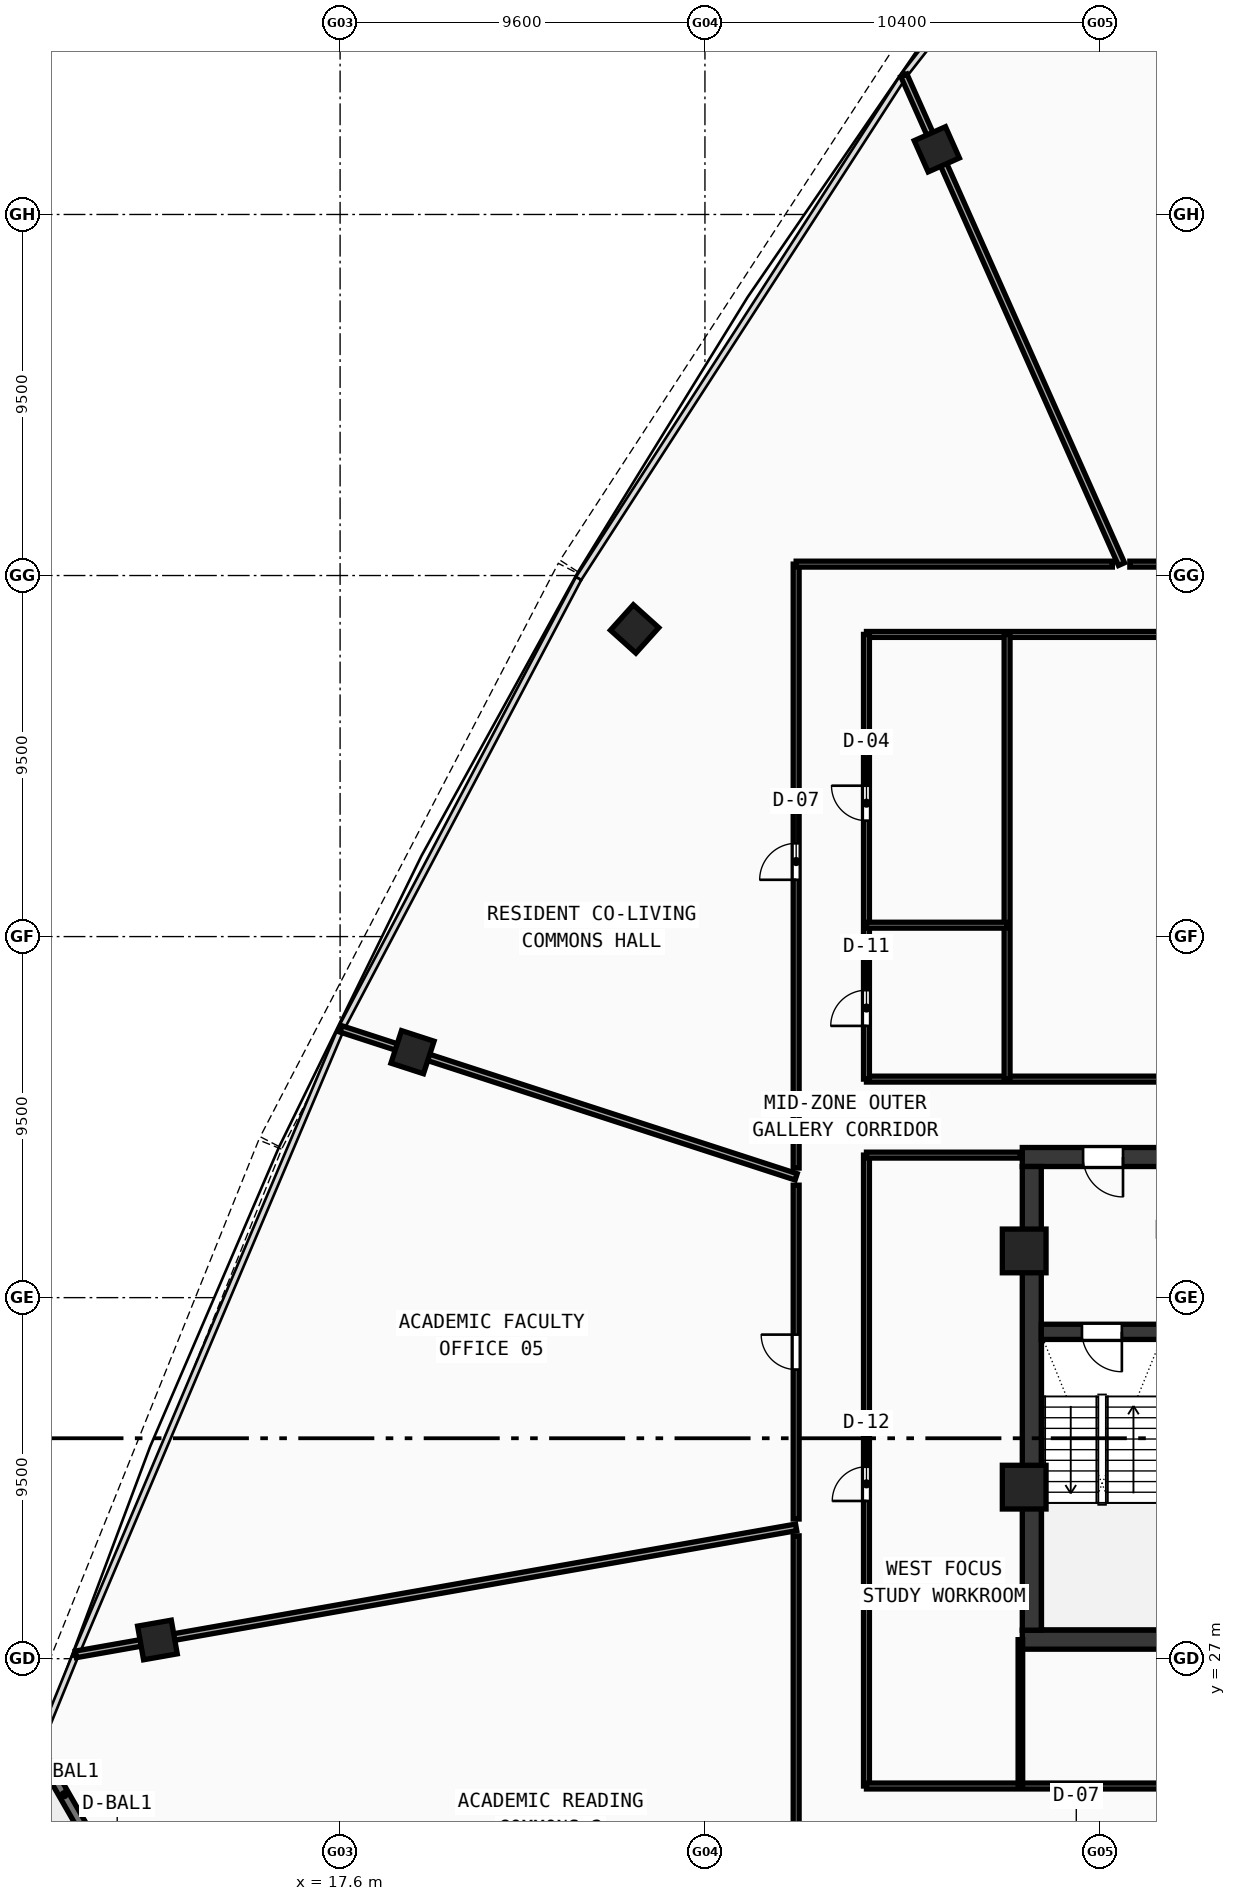
"""IFC4 building model, lengths in metres.
Left out: names, types, materials, properties, quantities, classifications, styles, units other than length and angle.
Written with IfcOpenShell. Run it as: python <this file> out.ifc"""

import sys

from ifc_helpers import new_model, si_unit, direction, frame, frame_2d, origin, origin_with_axes, origin_2d, place, context, subcontext, project, spatial, rectangle, hollow_rectangle, extrude, source, transform, mapped, element, fill, save


model = new_model("IFC4")
c1 = context("Model", 3, precision=1e-05, world=origin(), true_north=direction((0.0, 1.0)))
c2 = subcontext(c1, "Body", "Model", "MODEL_VIEW")
j1 = project(units=[si_unit("LENGTHUNIT", "METRE"), si_unit("PLANEANGLEUNIT", "RADIAN")], contexts=[c1])
p1 = place(None, origin())
s1 = spatial("IfcSite", under=j1, at=p1, CompositionType="ELEMENT")
p2 = place(p1, origin())
s2 = spatial("IfcBuilding", under=s1, at=p2, CompositionType="ELEMENT")
p3 = place(p2, frame((0.0, 0.0, 192.36)))
s3 = spatial("IfcBuildingStorey", under=s2, at=p3, CompositionType="ELEMENT", Elevation=192.36)
p4 = place(p3, frame((35.55, 27.5, 0.0), z_axis=(0.0, 0.0, 1.0), x_axis=(1.0, 0.0, 0.0)))
e1 = element("IfcWall", 1, at=p4, inside=s3, PredefinedType="SHEAR", context=c2, shape_type="SweptSolid", body=[
    extrude(rectangle(XDim=24.9, YDim=0.5, at=frame_2d((12.45, 0.0))), origin(), (0.0, 0.0, 1.0), 3.54),
])
p5 = place(p3, frame((35.55, 40.2, 0.0), z_axis=(0.0, 0.0, 1.0), x_axis=(1.0, 0.0, 0.0)))
e2 = element("IfcWall", 2, at=p5, inside=s3, PredefinedType="SHEAR", context=c2, shape_type="SweptSolid", body=[
    extrude(rectangle(XDim=11.25, YDim=0.5, at=frame_2d((5.625, 0.0))), origin(), (0.0, 0.0, 1.0), 3.54),
])
p6 = place(p5, frame((1.6, 0.0, 0.0)))
e3 = element("IfcOpeningElement", 3, at=p6, cuts=e2, PredefinedType="OPENING", context=c2, shape_type="SweptSolid", body=[
    extrude(rectangle(XDim=1.05, YDim=2.1, at=frame_2d((0.525, 1.05))), frame((0.0, 0.26, 0.0), z_axis=(0.0, -1.0, 0.0), x_axis=(1.0, 0.0, 0.0)), (0.0, 0.0, 1.0), 0.52),
])
p7 = place(p3, frame((35.8, 27.75, 0.0), z_axis=(0.0, 0.0, 1.0), x_axis=(0.0, 1.0, 0.0)))
e4 = element("IfcWall", 4, at=p7, inside=s3, PredefinedType="SHEAR", context=c2, shape_type="SweptSolid", body=[
    extrude(rectangle(XDim=12.2, YDim=0.5, at=frame_2d((6.1, 0.0))), origin(), (0.0, 0.0, 1.0), 3.54),
])
p8 = place(p3, frame((36.05, 35.6, 0.0), z_axis=(0.0, 0.0, 1.0), x_axis=(1.0, 0.0, 0.0)))
e5 = element("IfcWall", 5, at=p8, inside=s3, PredefinedType="SHEAR", context=c2, shape_type="SweptSolid", body=[
    extrude(rectangle(XDim=3.15, YDim=0.4, at=frame_2d((1.575, 0.0))), origin(), (0.0, 0.0, 1.0), 3.54),
])
p9 = place(p8, frame((1.07, 0.0, 0.0)))
e6 = element("IfcOpeningElement", 6, at=p9, cuts=e5, PredefinedType="OPENING", context=c2, shape_type="SweptSolid", body=[
    extrude(rectangle(XDim=1.05, YDim=2.1, at=frame_2d((0.525, 1.05))), frame((0.0, 0.21, 0.0), z_axis=(0.0, -1.0, 0.0), x_axis=(1.0, 0.0, 0.0)), (0.0, 0.0, 1.0), 0.42),
])
m1 = source(origin(), c2, "Body", "SweptSolid", [
    extrude(hollow_rectangle(XDim=1.15, YDim=1.15, WallThickness=0.048, at=origin_2d()), origin(), (0.0, 0.0, 1.0), 3.8),
])
for number, where, z_axis, x_axis in (
    (7, (35.6, 37.729, -0.26), (0.0, 0.0, 1.0), (1.0, 0.0, 0.0)),
    (8, (35.6, 31.513, -0.26), (0.0, 0.0, 1.0), (1.0, 0.0, 0.0)),
):
    element("IfcColumn", number, at=place(p3, frame(where, z_axis=z_axis, x_axis=x_axis)), inside=s3, PredefinedType="COLUMN", context=c2, shape_type="MappedRepresentation", body=[
        mapped(m1, transform((0.0, 0.0, 0.0), scale=1.0)),
    ])
m2 = source(origin(), c2, "Body", "SweptSolid", [
    extrude(hollow_rectangle(XDim=0.9, YDim=0.9, WallThickness=0.036, at=origin_2d()), origin(), (0.0, 0.0, 1.0), 3.8),
])
for number, where, z_axis, x_axis in (
    (9, (33.301, 66.715, -0.26), (0.0, 0.0, 1.0), (-0.914, -0.407, 0.0)),
    (10, (25.349, 54.095, -0.26), (0.0, 0.0, 1.0), (-0.669, -0.743, 0.0)),
    (11, (19.505, 42.958, -0.26), (0.0, 0.0, 1.0), (-0.309, -0.951, 0.0)),
    (12, (12.793, 27.492, -0.26), (0.0, 0.0, 1.0), (0.174, -0.985, 0.0)),
):
    element("IfcColumn", number, at=place(p3, frame(where, z_axis=z_axis, x_axis=x_axis)), inside=s3, PredefinedType="COLUMN", context=c2, shape_type="MappedRepresentation", body=[
        mapped(m2, transform((0.0, 0.0, 0.0), scale=1.0)),
    ])
p10 = place(p3, frame((9.611, 24.686, 0.0), z_axis=(0.0, 0.0, 1.0), x_axis=(0.497930869929, -0.867216725376, 0.0)))
e13 = element("IfcWall", 13, at=p10, inside=s3, PredefinedType="STANDARD", context=c2, shape_type="SweptSolid", body=[
    extrude(rectangle(XDim=8.534, YDim=0.26, at=frame_2d((4.267, 0.0))), origin(), (0.0, 0.0, 1.0), 3.54),
])
p11 = place(p10, frame((3.367, 0.0, 0.0)))
e14 = element("IfcOpeningElement", 14, at=p11, cuts=e13, PredefinedType="OPENING", context=c2, shape_type="SweptSolid", body=[
    extrude(rectangle(XDim=1.8, YDim=2.15, at=frame_2d((0.9, 1.075))), frame((0.0, 0.14, 0.0), z_axis=(0.0, -1.0, 0.0), x_axis=(1.0, 0.0, 0.0)), (0.0, 0.0, 1.0), 0.28),
])
p12 = place(p3, frame((31.45, 42.25, 0.0), z_axis=(0.0, 0.0, 1.0), x_axis=(1.0, 0.0, 0.0)))
e15 = element("IfcWall", 15, at=p12, inside=s3, PredefinedType="PARTITIONING", context=c2, shape_type="SweptSolid", body=[
    extrude(rectangle(XDim=33.1, YDim=0.155, at=frame_2d((16.55, 0.0))), origin(), (0.0, 0.0, 1.0), 2.89),
])
p13 = place(p3, frame((31.45, 53.95, 0.0), z_axis=(0.0, 0.0, 1.0), x_axis=(1.0, 0.0, 0.0)))
e16 = element("IfcWall", 16, at=p13, inside=s3, PredefinedType="PARTITIONING", context=c2, shape_type="SweptSolid", body=[
    extrude(rectangle(XDim=33.1, YDim=0.155, at=frame_2d((16.55, 0.0))), origin(), (0.0, 0.0, 1.0), 2.89),
])
p14 = place(p13, frame((8.0, 0.0, 0.0)))
e17 = element("IfcOpeningElement", 17, at=p14, cuts=e16, PredefinedType="OPENING", context=c2, shape_type="SweptSolid", body=[
    extrude(rectangle(XDim=0.92, YDim=2.1, at=frame_2d((0.46, 1.05))), frame((0.0, 0.087, 0.0), z_axis=(0.0, -1.0, 0.0), x_axis=(1.0, 0.0, 0.0)), (0.0, 0.0, 1.0), 0.175),
])
p15 = place(p13, frame((26.05, 0.0, 0.0)))
e18 = element("IfcOpeningElement", 18, at=p15, cuts=e16, PredefinedType="OPENING", context=c2, shape_type="SweptSolid", body=[
    extrude(rectangle(XDim=0.92, YDim=2.1, at=frame_2d((0.46, 1.05))), frame((0.0, 0.087, 0.0), z_axis=(0.0, -1.0, 0.0), x_axis=(1.0, 0.0, 0.0)), (0.0, 0.0, 1.0), 0.175),
])
p16 = place(p3, frame((31.45, 42.25, 0.0), z_axis=(0.0, 0.0, 1.0), x_axis=(0.0, 1.0, 0.0)))
e19 = element("IfcWall", 19, at=p16, inside=s3, PredefinedType="PARTITIONING", context=c2, shape_type="SweptSolid", body=[
    extrude(rectangle(XDim=11.7, YDim=0.155, at=frame_2d((5.85, 0.0))), origin(), (0.0, 0.0, 1.0), 2.89),
])
p17 = place(p16, frame((1.4, 0.0, 0.0)))
e20 = element("IfcOpeningElement", 20, at=p17, cuts=e19, PredefinedType="OPENING", context=c2, shape_type="SweptSolid", body=[
    extrude(rectangle(XDim=0.94, YDim=2.1, at=frame_2d((0.47, 1.05))), frame((0.0, 0.087, 0.0), z_axis=(0.0, -1.0, 0.0), x_axis=(1.0, 0.0, 0.0)), (0.0, 0.0, 1.0), 0.175),
])
p18 = place(p16, frame((6.8, 0.0, 0.0)))
e21 = element("IfcOpeningElement", 21, at=p18, cuts=e19, PredefinedType="OPENING", context=c2, shape_type="SweptSolid", body=[
    extrude(rectangle(XDim=0.92, YDim=2.1, at=frame_2d((0.46, 1.05))), frame((0.0, 0.087, 0.0), z_axis=(0.0, -1.0, 0.0), x_axis=(1.0, 0.0, 0.0)), (0.0, 0.0, 1.0), 0.175),
])
p19 = place(p3, frame((35.15, 42.25, 0.0), z_axis=(0.0, 0.0, 1.0), x_axis=(0.0, 1.0, 0.0)))
e22 = element("IfcWall", 22, at=p19, inside=s3, PredefinedType="PARTITIONING", context=c2, shape_type="SweptSolid", body=[
    extrude(rectangle(XDim=11.7, YDim=0.155, at=frame_2d((5.85, 0.0))), origin(), (0.0, 0.0, 1.0), 2.89),
])
p20 = place(p3, frame((31.45, 46.3, 0.0), z_axis=(0.0, 0.0, 1.0), x_axis=(1.0, 0.0, 0.0)))
e23 = element("IfcWall", 23, at=p20, inside=s3, PredefinedType="PARTITIONING", context=c2, shape_type="SweptSolid", body=[
    extrude(rectangle(XDim=3.7, YDim=0.155, at=frame_2d((1.85, 0.0))), origin(), (0.0, 0.0, 1.0), 2.89),
])
p21 = place(p3, frame((31.45, 23.65, 0.0), z_axis=(0.0, 0.0, 1.0), x_axis=(0.0, 1.0, 0.0)))
e24 = element("IfcWall", 24, at=p21, inside=s3, PredefinedType="PARTITIONING", context=c2, shape_type="SweptSolid", body=[
    extrude(rectangle(XDim=16.6, YDim=0.155, at=frame_2d((8.3, 0.0))), origin(), (0.0, 0.0, 1.0), 2.89),
])
p22 = place(p21, frame((7.5, 0.0, 0.0)))
e25 = element("IfcOpeningElement", 25, at=p22, cuts=e24, PredefinedType="OPENING", context=c2, shape_type="SweptSolid", body=[
    extrude(rectangle(XDim=0.9, YDim=2.08, at=frame_2d((0.45, 1.04))), frame((0.0, 0.087, 0.0), z_axis=(0.0, -1.0, 0.0), x_axis=(1.0, 0.0, 0.0)), (0.0, 0.0, 1.0), 0.175),
])
p23 = place(p3, frame((31.45, 23.65, 0.0), z_axis=(0.0, 0.0, 1.0), x_axis=(1.0, 0.0, 0.0)))
e26 = element("IfcWall", 26, at=p23, inside=s3, PredefinedType="PARTITIONING", context=c2, shape_type="SweptSolid", body=[
    extrude(rectangle(XDim=33.1, YDim=0.155, at=frame_2d((16.55, 0.0))), origin(), (0.0, 0.0, 1.0), 2.89),
])
p24 = place(p23, frame((16.0, 0.0, 0.0)))
e27 = element("IfcOpeningElement", 27, at=p24, cuts=e26, PredefinedType="OPENING", context=c2, shape_type="SweptSolid", body=[
    extrude(rectangle(XDim=0.92, YDim=2.1, at=frame_2d((0.46, 1.05))), frame((0.0, 0.087, 0.0), z_axis=(0.0, -1.0, 0.0), x_axis=(1.0, 0.0, 0.0)), (0.0, 0.0, 1.0), 0.175),
])
p25 = place(p3, frame((31.45, 40.25, 0.0), z_axis=(0.0, 0.0, 1.0), x_axis=(1.0, 0.0, 0.0)))
e28 = element("IfcWall", 28, at=p25, inside=s3, PredefinedType="PARTITIONING", context=c2, shape_type="SweptSolid", body=[
    extrude(rectangle(XDim=4.05, YDim=0.155, at=frame_2d((2.025, 0.0))), origin(), (0.0, 0.0, 1.0), 3.54),
])
p26 = place(p3, frame((35.5, 23.65, 0.0), z_axis=(0.0, 0.0, 1.0), x_axis=(0.0, 1.0, 0.0)))
e29 = element("IfcWall", 29, at=p26, inside=s3, PredefinedType="PARTITIONING", context=c2, shape_type="SweptSolid", body=[
    extrude(rectangle(XDim=3.85, YDim=0.12, at=frame_2d((1.925, 0.0))), origin(), (0.0, 0.0, 1.0), 3.14),
])
p27 = place(p3, frame((38.16, 55.8, 0.0), z_axis=(0.0, 0.0, 1.0), x_axis=(-0.406725691424, 0.913550333554, 0.0)))
e30 = element("IfcWall", 30, at=p27, inside=s3, PredefinedType="PARTITIONING", context=c2, shape_type="SweptSolid", body=[
    extrude(rectangle(XDim=14.078, YDim=0.175, at=frame_2d((7.039, 0.0))), origin(), (0.0, 0.0, 1.0), 2.89),
])
p28 = place(p3, frame((29.6, 39.678, 0.0), z_axis=(0.0, 0.0, 1.0), x_axis=(-0.951056149915, 0.309018121975, 0.0)))
e31 = element("IfcWall", 31, at=p28, inside=s3, PredefinedType="PARTITIONING", context=c2, shape_type="SweptSolid", body=[
    extrude(rectangle(XDim=12.593, YDim=0.175, at=frame_2d((6.296, 0.0))), origin(), (0.0, 0.0, 1.0), 2.89),
])
p29 = place(p3, frame((29.6, 30.456, 0.0), z_axis=(0.0, 0.0, 1.0), x_axis=(-0.984807685374, -0.173648561263, 0.0)))
e32 = element("IfcWall", 32, at=p29, inside=s3, PredefinedType="PARTITIONING", context=c2, shape_type="SweptSolid", body=[
    extrude(rectangle(XDim=19.246, YDim=0.175, at=frame_2d((9.623, 0.0))), origin(), (0.0, 0.0, 1.0), 2.89),
])
p30 = place(p3, frame((29.6, 21.8, 0.0), z_axis=(0.0, 0.0, 1.0), x_axis=(0.0, 1.0, 0.0)))
e33 = element("IfcWall", 33, at=p30, inside=s3, PredefinedType="PARTITIONING", context=c2, shape_type="SweptSolid", body=[
    extrude(rectangle(XDim=8.432, YDim=0.155, at=frame_2d((4.216, 0.0))), origin(), (0.0, 0.0, 1.0), 3.14),
])
p31 = place(p3, frame((29.6, 30.675, 0.0), z_axis=(0.0, 0.0, 1.0), x_axis=(0.0, 1.0, 0.0)))
e34 = element("IfcWall", 34, at=p31, inside=s3, PredefinedType="PARTITIONING", context=c2, shape_type="SweptSolid", body=[
    extrude(rectangle(XDim=8.783, YDim=0.155, at=frame_2d((4.392, 0.0))), origin(), (0.0, 0.0, 1.0), 3.14),
])
p32 = place(p31, frame((3.932, 0.0, 0.0)))
e35 = element("IfcOpeningElement", 35, at=p32, cuts=e34, PredefinedType="OPENING", context=c2, shape_type="SweptSolid", body=[
    extrude(rectangle(XDim=0.92, YDim=2.1, at=frame_2d((0.46, 1.05))), frame((0.0, 0.087, 0.0), z_axis=(0.0, -1.0, 0.0), x_axis=(1.0, 0.0, 0.0)), (0.0, 0.0, 1.0), 0.175),
])
p33 = place(p3, frame((29.6, 39.91, 0.0), z_axis=(0.0, 0.0, 1.0), x_axis=(0.0, 1.0, 0.0)))
e36 = element("IfcWall", 36, at=p33, inside=s3, PredefinedType="PARTITIONING", context=c2, shape_type="SweptSolid", body=[
    extrude(rectangle(XDim=15.89, YDim=0.155, at=frame_2d((7.945, 0.0))), origin(), (0.0, 0.0, 1.0), 2.89),
])
p34 = place(p33, frame((7.584, 0.0, 0.0)))
e37 = element("IfcOpeningElement", 37, at=p34, cuts=e36, PredefinedType="OPENING", context=c2, shape_type="SweptSolid", body=[
    extrude(rectangle(XDim=0.96, YDim=2.12, at=frame_2d((0.48, 1.06))), frame((0.0, 0.087, 0.0), z_axis=(0.0, -1.0, 0.0), x_axis=(1.0, 0.0, 0.0)), (0.0, 0.0, 1.0), 0.175),
])
p35 = place(p3, frame((29.6, 55.8, 0.0), z_axis=(0.0, 0.0, 1.0), x_axis=(1.0, 0.0, 0.0)))
e38 = element("IfcWall", 38, at=p35, inside=s3, PredefinedType="PARTITIONING", context=c2, shape_type="SweptSolid", body=[
    extrude(rectangle(XDim=8.32, YDim=0.155, at=frame_2d((4.16, 0.0))), origin(), (0.0, 0.0, 1.0), 3.14),
])
p36 = place(p3, frame((38.38, 55.8, 0.0), z_axis=(0.0, 0.0, 1.0), x_axis=(1.0, 0.0, 0.0)))
e39 = element("IfcWall", 39, at=p36, inside=s3, PredefinedType="PARTITIONING", context=c2, shape_type="SweptSolid", body=[
    extrude(rectangle(XDim=5.329, YDim=0.155, at=frame_2d((2.665, 0.0))), origin(), (0.0, 0.0, 1.0), 2.89),
])
p37 = place(p36, frame((2.13, 0.0, 0.0)))
e40 = element("IfcOpeningElement", 40, at=p37, cuts=e39, PredefinedType="OPENING", context=c2, shape_type="SweptSolid", body=[
    extrude(rectangle(XDim=0.92, YDim=2.1, at=frame_2d((0.46, 1.05))), frame((0.0, 0.087, 0.0), z_axis=(0.0, -1.0, 0.0), x_axis=(1.0, 0.0, 0.0)), (0.0, 0.0, 1.0), 0.175),
])
m3 = source(origin(), c2, "Body", "SweptSolid", [
    extrude(rectangle(XDim=1.05, YDim=2.1, at=frame_2d((0.525, 1.05))), frame((0.0, 0.025, 0.0), z_axis=(0.0, -1.0, 0.0), x_axis=(1.0, 0.0, 0.0)), (0.0, 0.0, 1.0), 0.05),
])
p38 = place(p9, frame((1.05, 0.0, 0.0), z_axis=(0.0, 0.0, 1.0), x_axis=(-1.0, 0.0, 0.0)))
e41 = element("IfcDoor", 41, at=p38, inside=s3, OperationType="SINGLE_SWING_LEFT", PredefinedType="DOOR", context=c2, shape_type="MappedRepresentation", body=[
    mapped(m3, transform((0.0, 0.0, 0.0), scale=1.0)),
])
fill(e6, e41)
p39 = place(p6, frame((1.05, 0.0, 0.0), z_axis=(0.0, 0.0, 1.0), x_axis=(-1.0, 0.0, 0.0)))
e42 = element("IfcDoor", 42, at=p39, inside=s3, OperationType="SINGLE_SWING_LEFT", PredefinedType="DOOR", context=c2, shape_type="MappedRepresentation", body=[
    mapped(m3, transform((0.0, 0.0, 0.0), scale=1.0)),
])
fill(e3, e42)
m4 = source(origin(), c2, "Body", "SweptSolid", [
    extrude(rectangle(XDim=0.94, YDim=2.1, at=frame_2d((0.47, 1.05))), frame((0.0, 0.025, 0.0), z_axis=(0.0, -1.0, 0.0), x_axis=(1.0, 0.0, 0.0)), (0.0, 0.0, 1.0), 0.05),
])
p40 = place(p17, origin_with_axes())
e43 = element("IfcDoor", 43, at=p40, inside=s3, OperationType="SINGLE_SWING_LEFT", PredefinedType="DOOR", context=c2, shape_type="MappedRepresentation", body=[
    mapped(m4, transform((0.0, 0.0, 0.0), scale=1.0)),
])
fill(e20, e43)
m5 = source(origin(), c2, "Body", "SweptSolid", [
    extrude(rectangle(XDim=0.92, YDim=2.1, at=frame_2d((0.46, 1.05))), frame((0.0, 0.025, 0.0), z_axis=(0.0, -1.0, 0.0), x_axis=(1.0, 0.0, 0.0)), (0.0, 0.0, 1.0), 0.05),
])
p41 = place(p18, origin_with_axes())
e44 = element("IfcDoor", 44, at=p41, inside=s3, OperationType="SINGLE_SWING_RIGHT", PredefinedType="DOOR", context=c2, shape_type="MappedRepresentation", body=[
    mapped(m5, transform((0.0, 0.0, 0.0), scale=1.0)),
])
fill(e21, e44)
m6 = source(origin(), c2, "Body", "SweptSolid", [
    extrude(rectangle(XDim=0.9, YDim=2.08, at=frame_2d((0.45, 1.04))), frame((0.0, 0.025, 0.0), z_axis=(0.0, -1.0, 0.0), x_axis=(1.0, 0.0, 0.0)), (0.0, 0.0, 1.0), 0.05),
])
p42 = place(p22, origin_with_axes())
e45 = element("IfcDoor", 45, at=p42, inside=s3, OperationType="SINGLE_SWING_LEFT", PredefinedType="DOOR", context=c2, shape_type="MappedRepresentation", body=[
    mapped(m6, transform((0.0, 0.0, 0.0), scale=1.0)),
])
fill(e25, e45)
m7 = source(origin(), c2, "Body", "SweptSolid", [
    extrude(rectangle(XDim=0.96, YDim=2.12, at=frame_2d((0.48, 1.06))), frame((0.0, 0.025, 0.0), z_axis=(0.0, -1.0, 0.0), x_axis=(1.0, 0.0, 0.0)), (0.0, 0.0, 1.0), 0.05),
])
p43 = place(p34, origin_with_axes())
e46 = element("IfcDoor", 46, at=p43, inside=s3, OperationType="SINGLE_SWING_LEFT", PredefinedType="DOOR", context=c2, shape_type="MappedRepresentation", body=[
    mapped(m7, transform((0.0, 0.0, 0.0), scale=1.0)),
])
fill(e37, e46)
p44 = place(p32, origin_with_axes())
e47 = element("IfcDoor", 47, at=p44, inside=s3, OperationType="SINGLE_SWING_RIGHT", PredefinedType="DOOR", context=c2, shape_type="MappedRepresentation", body=[
    mapped(m5, transform((0.0, 0.0, 0.0), scale=1.0)),
])
fill(e35, e47)
save(model, sys.argv[1])
